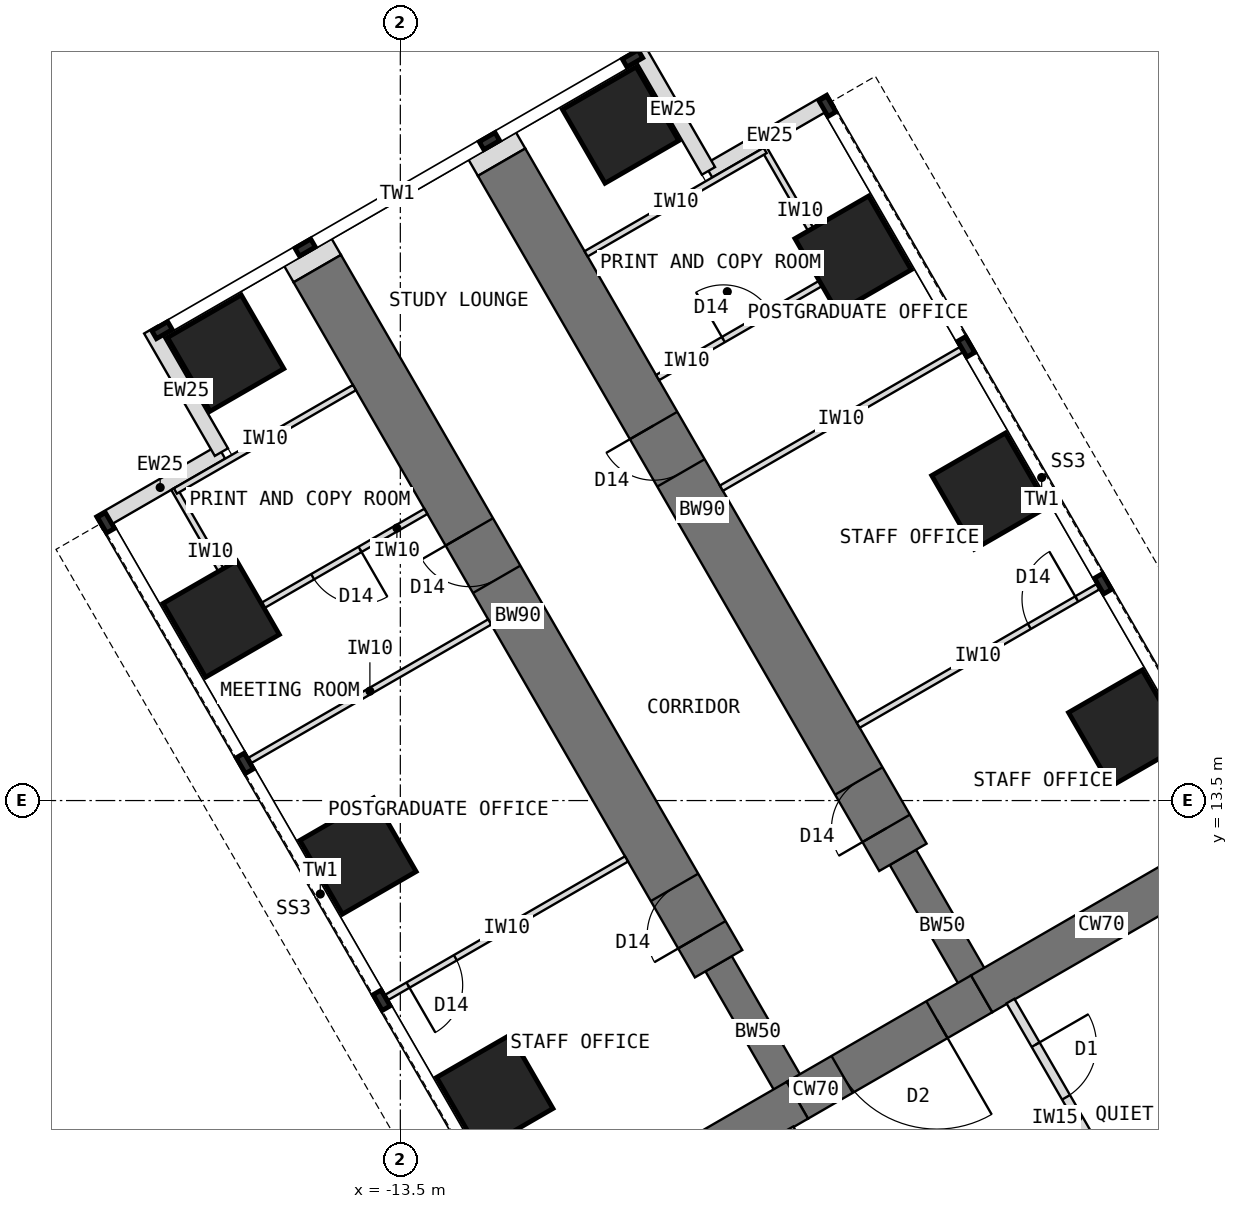
"""IFC4 building model, lengths in metres.
Left out: names, types, materials, properties, quantities, classifications, styles, units other than length and angle.
Written with IfcOpenShell. Run it as: python <this file> out.ifc"""

import sys

from ifc_helpers import new_model, si_unit, direction, frame, frame_2d, origin, origin_2d, place, context, subcontext, project, spatial, rectangle, extrude, element, fill, save


model = new_model("IFC4")
c1 = context("Model", 3, precision=1e-05, world=origin(), true_north=direction((0.0, 1.0)))
c2 = subcontext(c1, "Body", "Model", "MODEL_VIEW")
j1 = project(units=[si_unit("LENGTHUNIT", "METRE"), si_unit("PLANEANGLEUNIT", "RADIAN")], contexts=[c1])
p1 = place(None, origin())
s1 = spatial("IfcSite", under=j1, at=p1, CompositionType="ELEMENT")
p2 = place(p1, origin())
s2 = spatial("IfcBuilding", under=s1, at=p2, CompositionType="ELEMENT")
p3 = place(p2, frame((0.0, 0.0, 84.5)))
s3 = spatial("IfcBuildingStorey", under=s2, at=p3, CompositionType="ELEMENT", Elevation=84.5)
p4 = place(p3, frame((0.0, 12.596, 0.0), z_axis=(0.0, 0.0, 1.0), x_axis=(-0.866011268655, -0.500024481964, 0.0)))
e1 = element("IfcWall", 1, at=p4, inside=s3, PredefinedType="SHEAR", context=c2, shape_type="SweptSolid", body=[
    extrude(rectangle(XDim=4.548, YDim=0.7, at=frame_2d((2.274, 0.0))), origin(), (0.0, 0.0, 1.0), 4.0),
])
p5 = place(p3, frame((-3.939, 10.322, 0.0), z_axis=(0.0, 0.0, 1.0), x_axis=(-0.866019471182, -0.500010275428, 0.0)))
e2 = element("IfcWall", 2, at=p5, inside=s3, PredefinedType="SHEAR", context=c2, shape_type="SweptSolid", body=[
    extrude(rectangle(XDim=3.5, YDim=0.7, at=frame_2d((1.75, 0.0))), origin(), (0.0, 0.0, 1.0), 4.0),
])
p6 = place(p5, frame((0.85, 0.0, 0.0)))
e3 = element("IfcOpeningElement", 3, at=p6, cuts=e2, PredefinedType="OPENING", context=c2, shape_type="SweptSolid", body=[
    extrude(rectangle(XDim=1.8, YDim=2.1, at=frame_2d((0.9, 1.05))), frame((0.0, 0.36, 0.0), z_axis=(0.0, -1.0, 0.0), x_axis=(1.0, 0.0, 0.0)), (0.0, 0.0, 1.0), 0.72),
])
p7 = place(p3, frame((-6.97, 8.572, 0.0), z_axis=(0.0, 0.0, 1.0), x_axis=(-0.866034513004, -0.499984222037, 0.0)))
e4 = element("IfcWall", 4, at=p7, inside=s3, PredefinedType="SHEAR", context=c2, shape_type="SweptSolid", body=[
    extrude(rectangle(XDim=4.548, YDim=0.7, at=frame_2d((2.274, 0.0))), origin(), (0.0, 0.0, 1.0), 4.0),
])
p8 = place(p3, frame((-6.97, 8.572, 0.0), z_axis=(0.0, 0.0, 1.0), x_axis=(-0.499988811324, 0.866031863473, 0.0)))
e5 = element("IfcWall", 5, at=p8, inside=s3, PredefinedType="SHEAR", context=c2, shape_type="SweptSolid", body=[
    extrude(rectangle(XDim=2.592, YDim=0.5, at=frame_2d((1.296, 0.0))), origin(), (0.0, 0.0, 1.0), 4.0),
])
p9 = place(p3, frame((-8.266, 10.816, 0.0), z_axis=(0.0, 0.0, 1.0), x_axis=(-0.499996231654, 0.866027579429, 0.0)))
e6 = element("IfcWall", 6, at=p9, inside=s3, PredefinedType="SHEAR", context=c2, shape_type="SweptSolid", body=[
    extrude(rectangle(XDim=13.2, YDim=0.9, at=frame_2d((6.6, 0.0))), origin(), (0.0, 0.0, 1.0), 4.0),
])
p10 = place(p9, frame((0.55, 0.0, 0.0)))
e7 = element("IfcOpeningElement", 7, at=p10, cuts=e6, PredefinedType="OPENING", context=c2, shape_type="SweptSolid", body=[
    extrude(rectangle(XDim=0.9, YDim=2.1, at=frame_2d((0.45, 1.05))), frame((0.0, 0.46, 0.0), z_axis=(0.0, -1.0, 0.0), x_axis=(1.0, 0.0, 0.0)), (0.0, 0.0, 1.0), 0.92),
])
p11 = place(p9, frame((7.3, 0.0, 0.0)))
e8 = element("IfcOpeningElement", 8, at=p11, cuts=e6, PredefinedType="OPENING", context=c2, shape_type="SweptSolid", body=[
    extrude(rectangle(XDim=0.9, YDim=2.1, at=frame_2d((0.45, 1.05))), frame((0.0, 0.46, 0.0), z_axis=(0.0, -1.0, 0.0), x_axis=(1.0, 0.0, 0.0)), (0.0, 0.0, 1.0), 0.92),
])
p12 = place(p3, frame((-3.939, 10.322, 0.0), z_axis=(0.0, 0.0, 1.0), x_axis=(-0.499918158782, 0.866072649678, 0.0)))
e9 = element("IfcWall", 9, at=p12, inside=s3, PredefinedType="SHEAR", context=c2, shape_type="SweptSolid", body=[
    extrude(rectangle(XDim=2.592, YDim=0.5, at=frame_2d((1.296, 0.0))), origin(), (0.0, 0.0, 1.0), 4.0),
])
p13 = place(p3, frame((-5.234, 12.566, 0.0), z_axis=(0.0, 0.0, 1.0), x_axis=(-0.500010103361, 0.866019570528, 0.0)))
e10 = element("IfcWall", 10, at=p13, inside=s3, PredefinedType="SHEAR", context=c2, shape_type="SweptSolid", body=[
    extrude(rectangle(XDim=13.2, YDim=0.9, at=frame_2d((6.6, 0.0))), origin(), (0.0, 0.0, 1.0), 4.0),
])
p14 = place(p13, frame((0.55, 0.0, 0.0)))
e11 = element("IfcOpeningElement", 11, at=p14, cuts=e10, PredefinedType="OPENING", context=c2, shape_type="SweptSolid", body=[
    extrude(rectangle(XDim=0.9, YDim=2.1, at=frame_2d((0.45, 1.05))), frame((0.0, 0.46, 0.0), z_axis=(0.0, -1.0, 0.0), x_axis=(1.0, 0.0, 0.0)), (0.0, 0.0, 1.0), 0.92),
])
p15 = place(p13, frame((7.3, 0.0, 0.0)))
e12 = element("IfcOpeningElement", 12, at=p15, cuts=e10, PredefinedType="OPENING", context=c2, shape_type="SweptSolid", body=[
    extrude(rectangle(XDim=0.9, YDim=2.1, at=frame_2d((0.45, 1.05))), frame((0.0, 0.46, 0.0), z_axis=(0.0, -1.0, 0.0), x_axis=(1.0, 0.0, 0.0)), (0.0, 0.0, 1.0), 0.92),
])
for number, where, z_axis, x_axis in (
    (13, (-11.946, 8.691, 0.0), (0.0, 0.0, 1.0), (0.866, 0.5, 0.0)),
    (14, (-1.554, 14.691, 0.0), (0.0, 0.0, 1.0), (0.866, 0.5, 0.0)),
    (15, (-14.196, 12.588, 0.0), (0.0, 0.0, 1.0), (0.866, 0.5, 0.0)),
    (16, (-3.804, 18.588, 0.0), (0.0, 0.0, 1.0), (0.866, 0.5, 0.0)),
    (17, (-16.446, 16.486, 0.0), (0.0, 0.0, 1.0), (0.866, 0.5, 0.0)),
    (18, (-6.054, 22.486, 0.0), (0.0, 0.0, 1.0), (0.866, 0.5, 0.0)),
    (19, (-16.373, 20.858, 0.0), (0.0, 0.0, 1.0), (0.866, 0.5, 0.0)),
    (20, (-9.877, 24.608, 0.0), (0.0, 0.0, 1.0), (0.866, 0.5, 0.0)),
):
    element("IfcColumn", number, at=place(p3, frame(where, z_axis=z_axis, x_axis=x_axis)), inside=s3, PredefinedType="COLUMN", context=c2, shape_type="SweptSolid", body=[
        extrude(rectangle(XDim=1.4, YDim=1.4, at=origin_2d()), origin(), (0.0, 0.0, 1.0), 4.0),
    ])
for number, where, z_axis, x_axis in (
    (21, (-18.456, 18.067, 0.0), (0.0, 0.0, 1.0), (0.866, 0.5, 0.0)),
    (22, (-16.443, 19.23, 0.0), (0.0, 0.0, 1.0), (-0.5, 0.866, 0.0)),
    (23, (-6.419, 25.017, 0.0), (0.0, 0.0, 1.0), (-0.866, -0.5, 0.0)),
    (24, (-8.432, 23.855, 0.0), (0.0, 0.0, 1.0), (-0.5, 0.866, 0.0)),
):
    element("IfcWall", number, at=place(p3, frame(where, z_axis=z_axis, x_axis=x_axis)), inside=s3, PredefinedType="STANDARD", context=c2, shape_type="SweptSolid", body=[
        extrude(rectangle(XDim=2.325, YDim=0.25, at=frame_2d((1.163, 0.0))), origin(), (0.0, 0.0, 1.0), 3.8),
    ])
for number, where, z_axis, x_axis in (
    (25, (-14.865, 22.248, 0.0), (0.0, 0.0, 1.0), (-0.5, 0.866, 0.0)),
    (26, (-11.834, 23.998, 0.0), (0.0, 0.0, 1.0), (-0.5, 0.866, 0.0)),
):
    element("IfcWall", number, at=place(p3, frame(where, z_axis=z_axis, x_axis=x_axis)), inside=s3, PredefinedType="PARTITIONING", context=c2, shape_type="SweptSolid", body=[
        extrude(rectangle(XDim=0.31, YDim=0.9, at=frame_2d((0.155, 0.0))), origin(), (0.0, 0.0, 1.0), 3.8),
    ])
p16 = place(p3, frame((-1.201, 6.12, 0.0), z_axis=(0.0, 0.0, 1.0), x_axis=(0.500002627198, 0.866023886965, 0.0)))
e27 = element("IfcWall", 27, at=p16, inside=s3, PredefinedType="SHEAR", context=c2, shape_type="SweptSolid", body=[
    extrude(rectangle(XDim=5.858, YDim=0.4, at=frame_2d((2.929, 0.0))), origin(), (0.0, 0.0, 1.0), 4.0),
])
p17 = place(p3, frame((-9.78, 12.54, 0.0), z_axis=(0.0, 0.0, 1.0), x_axis=(-0.866035472144, -0.499982560684, 0.0)))
e28 = element("IfcWall", 28, at=p17, inside=s3, PredefinedType="PARTITIONING", context=c2, shape_type="SweptSolid", body=[
    extrude(rectangle(XDim=4.55, YDim=0.1, at=frame_2d((2.275, 0.0))), origin(), (0.0, 0.0, 1.0), 3.8),
])
p18 = place(p17, frame((3.25, 0.0, 0.0)))
e29 = element("IfcOpeningElement", 29, at=p18, cuts=e28, PredefinedType="OPENING", context=c2, shape_type="SweptSolid", body=[
    extrude(rectangle(XDim=0.9, YDim=2.1, at=frame_2d((0.45, 1.05))), frame((0.0, 0.06, 0.0), z_axis=(0.0, -1.0, 0.0), x_axis=(1.0, 0.0, 0.0)), (0.0, 0.0, 1.0), 0.12),
])
p19 = place(p3, frame((-12.03, 16.437, 0.0), z_axis=(0.0, 0.0, 1.0), x_axis=(-0.866035472144, -0.499982560684, 0.0)))
e30 = element("IfcWall", 30, at=p19, inside=s3, PredefinedType="PARTITIONING", context=c2, shape_type="SweptSolid", body=[
    extrude(rectangle(XDim=4.55, YDim=0.1, at=frame_2d((2.275, 0.0))), origin(), (0.0, 0.0, 1.0), 3.8),
])
p20 = place(p3, frame((-16.025, 16.556, 0.0), z_axis=(0.0, 0.0, 1.0), x_axis=(-0.500077600433, 0.865980596518, 0.0)))
e31 = element("IfcWall", 31, at=p20, inside=s3, PredefinedType="PARTITIONING", context=c2, shape_type="SweptSolid", body=[
    extrude(rectangle(XDim=2.4, YDim=0.1, at=frame_2d((1.2, 0.0))), origin(), (0.0, 0.0, 1.0), 3.8),
])
p21 = place(p3, frame((-13.08, 18.256, 0.0), z_axis=(0.0, 0.0, 1.0), x_axis=(-0.866020560687, -0.500008388397, 0.0)))
e32 = element("IfcWall", 32, at=p21, inside=s3, PredefinedType="PARTITIONING", context=c2, shape_type="SweptSolid", body=[
    extrude(rectangle(XDim=3.4, YDim=0.1, at=frame_2d((1.7, 0.0))), origin(), (0.0, 0.0, 1.0), 3.8),
])
p22 = place(p21, frame((1.25, 0.0, 0.0)))
e33 = element("IfcOpeningElement", 33, at=p22, cuts=e32, PredefinedType="OPENING", context=c2, shape_type="SweptSolid", body=[
    extrude(rectangle(XDim=0.9, YDim=2.1, at=frame_2d((0.45, 1.05))), frame((0.0, 0.06, 0.0), z_axis=(0.0, -1.0, 0.0), x_axis=(1.0, 0.0, 0.0)), (0.0, 0.0, 1.0), 0.12),
])
p23 = place(p3, frame((-14.255, 20.291, 0.0), z_axis=(0.0, 0.0, 1.0), x_axis=(-0.866020560687, -0.500008388397, 0.0)))
e34 = element("IfcWall", 34, at=p23, inside=s3, PredefinedType="PARTITIONING", context=c2, shape_type="SweptSolid", body=[
    extrude(rectangle(XDim=3.4, YDim=0.1, at=frame_2d((1.7, 0.0))), origin(), (0.0, 0.0, 1.0), 3.8),
])
p24 = place(p3, frame((-5.97, 14.74, 0.0), z_axis=(0.0, 0.0, 1.0), x_axis=(0.866035472144, 0.499982560684, 0.0)))
e35 = element("IfcWall", 35, at=p24, inside=s3, PredefinedType="PARTITIONING", context=c2, shape_type="SweptSolid", body=[
    extrude(rectangle(XDim=4.55, YDim=0.1, at=frame_2d((2.275, 0.0))), origin(), (0.0, 0.0, 1.0), 3.8),
])
p25 = place(p24, frame((3.25, 0.0, 0.0)))
e36 = element("IfcOpeningElement", 36, at=p25, cuts=e35, PredefinedType="OPENING", context=c2, shape_type="SweptSolid", body=[
    extrude(rectangle(XDim=0.9, YDim=2.1, at=frame_2d((0.45, 1.05))), frame((0.0, 0.06, 0.0), z_axis=(0.0, -1.0, 0.0), x_axis=(1.0, 0.0, 0.0)), (0.0, 0.0, 1.0), 0.12),
])
p26 = place(p3, frame((-8.22, 18.637, 0.0), z_axis=(0.0, 0.0, 1.0), x_axis=(0.866012237902, 0.500022803284, 0.0)))
e37 = element("IfcWall", 37, at=p26, inside=s3, PredefinedType="PARTITIONING", context=c2, shape_type="SweptSolid", body=[
    extrude(rectangle(XDim=4.55, YDim=0.1, at=frame_2d((2.275, 0.0))), origin(), (0.0, 0.0, 1.0), 3.8),
])
p27 = place(p3, frame((-6.325, 22.156, 0.0), z_axis=(0.0, 0.0, 1.0), x_axis=(-0.500001309137, 0.866024647952, 0.0)))
e38 = element("IfcWall", 38, at=p27, inside=s3, PredefinedType="PARTITIONING", context=c2, shape_type="SweptSolid", body=[
    extrude(rectangle(XDim=2.4, YDim=0.1, at=frame_2d((1.2, 0.0))), origin(), (0.0, 0.0, 1.0), 3.8),
])
p28 = place(p3, frame((-9.27, 20.456, 0.0), z_axis=(0.0, 0.0, 1.0), x_axis=(0.866007419912, 0.500031147688, 0.0)))
e39 = element("IfcWall", 39, at=p28, inside=s3, PredefinedType="PARTITIONING", context=c2, shape_type="SweptSolid", body=[
    extrude(rectangle(XDim=3.4, YDim=0.1, at=frame_2d((1.7, 0.0))), origin(), (0.0, 0.0, 1.0), 3.8),
])
p29 = place(p28, frame((1.25, 0.0, 0.0)))
e40 = element("IfcOpeningElement", 40, at=p29, cuts=e39, PredefinedType="OPENING", context=c2, shape_type="SweptSolid", body=[
    extrude(rectangle(XDim=0.9, YDim=2.1, at=frame_2d((0.45, 1.05))), frame((0.0, 0.06, 0.0), z_axis=(0.0, -1.0, 0.0), x_axis=(1.0, 0.0, 0.0)), (0.0, 0.0, 1.0), 0.12),
])
p30 = place(p3, frame((-10.445, 22.491, 0.0), z_axis=(0.0, 0.0, 1.0), x_axis=(0.866007419912, 0.500031147688, 0.0)))
e41 = element("IfcWall", 41, at=p30, inside=s3, PredefinedType="PARTITIONING", context=c2, shape_type="SweptSolid", body=[
    extrude(rectangle(XDim=3.4, YDim=0.1, at=frame_2d((1.7, 0.0))), origin(), (0.0, 0.0, 1.0), 3.8),
])
p31 = place(p3, frame((-4.89, 4.27, 0.0), z_axis=(0.0, 0.0, 1.0), x_axis=(-0.500007369519, 0.866021148949, 0.0)))
e42 = element("IfcWall", 42, at=p31, inside=s3, PredefinedType="PARTITIONING", context=c2, shape_type="SweptSolid", body=[
    extrude(rectangle(XDim=4.426, YDim=0.15, at=frame_2d((2.213, 0.0))), origin(), (0.0, 0.0, 1.0), 3.8),
])
p32 = place(p31, frame((0.828, 0.0, 0.0)))
e43 = element("IfcOpeningElement", 43, at=p32, cuts=e42, PredefinedType="OPENING", context=c2, shape_type="SweptSolid", body=[
    extrude(rectangle(XDim=1.0, YDim=2.1, at=frame_2d((0.5, 1.05))), frame((0.0, 0.085, 0.0), z_axis=(0.0, -1.0, 0.0), x_axis=(1.0, 0.0, 0.0)), (0.0, 0.0, 1.0), 0.17),
])
p33 = place(p3, frame((-3.466, 10.202, 0.0), z_axis=(0.0, 0.0, 1.0), x_axis=(0.500007369519, -0.866021148949, 0.0)))
e44 = element("IfcWall", 44, at=p33, inside=s3, PredefinedType="PARTITIONING", context=c2, shape_type="SweptSolid", body=[
    extrude(rectangle(XDim=4.426, YDim=0.15, at=frame_2d((2.213, 0.0))), origin(), (0.0, 0.0, 1.0), 3.8),
])
p34 = place(p33, frame((0.828, 0.0, 0.0)))
e45 = element("IfcOpeningElement", 45, at=p34, cuts=e44, PredefinedType="OPENING", context=c2, shape_type="SweptSolid", body=[
    extrude(rectangle(XDim=1.0, YDim=2.1, at=frame_2d((0.5, 1.05))), frame((0.0, 0.085, 0.0), z_axis=(0.0, -1.0, 0.0), x_axis=(1.0, 0.0, 0.0)), (0.0, 0.0, 1.0), 0.17),
])
p35 = place(p6, origin())
e46 = element("IfcDoor", 46, at=p35, inside=s3, OperationType="DOUBLE_DOOR_DOUBLE_SWING", PredefinedType="DOOR", context=c2, shape_type="SweptSolid", body=[
    extrude(rectangle(XDim=1.72, YDim=2.06, at=frame_2d((0.9, 1.03))), frame((0.0, 0.025, 0.0), z_axis=(0.0, -1.0, 0.0), x_axis=(1.0, 0.0, 0.0)), (0.0, 0.0, 1.0), 0.05),
    extrude(rectangle(XDim=0.04, YDim=2.1, at=frame_2d((0.02, 1.05))), frame((0.0, 0.35, 0.0), z_axis=(0.0, -1.0, 0.0), x_axis=(1.0, 0.0, 0.0)), (0.0, 0.0, 1.0), 0.699),
    extrude(rectangle(XDim=0.04, YDim=2.1, at=frame_2d((1.78, 1.05))), frame((0.0, 0.35, 0.0), z_axis=(0.0, -1.0, 0.0), x_axis=(1.0, 0.0, 0.0)), (0.0, 0.0, 1.0), 0.699),
    extrude(rectangle(XDim=1.72, YDim=0.04, at=frame_2d((0.9, 2.08))), frame((0.0, 0.35, 0.0), z_axis=(0.0, -1.0, 0.0), x_axis=(1.0, 0.0, 0.0)), (0.0, 0.0, 1.0), 0.699),
])
fill(e3, e46)
p36 = place(p18, origin())
e47 = element("IfcDoor", 47, at=p36, inside=s3, OperationType="SINGLE_SWING_RIGHT", PredefinedType="DOOR", context=c2, shape_type="SweptSolid", body=[
    extrude(rectangle(XDim=0.9, YDim=2.1, at=frame_2d((0.45, 1.05))), frame((0.0, 0.025, 0.0), z_axis=(0.0, -1.0, 0.0), x_axis=(1.0, 0.0, 0.0)), (0.0, 0.0, 1.0), 0.05),
])
fill(e29, e47)
p37 = place(p22, origin())
e48 = element("IfcDoor", 48, at=p37, inside=s3, OperationType="SINGLE_SWING_LEFT", PredefinedType="DOOR", context=c2, shape_type="SweptSolid", body=[
    extrude(rectangle(XDim=0.9, YDim=2.1, at=frame_2d((0.45, 1.05))), frame((0.0, 0.025, 0.0), z_axis=(0.0, -1.0, 0.0), x_axis=(1.0, 0.0, 0.0)), (0.0, 0.0, 1.0), 0.05),
])
fill(e33, e48)
p38 = place(p25, origin())
e49 = element("IfcDoor", 49, at=p38, inside=s3, OperationType="SINGLE_SWING_RIGHT", PredefinedType="DOOR", context=c2, shape_type="SweptSolid", body=[
    extrude(rectangle(XDim=0.9, YDim=2.1, at=frame_2d((0.45, 1.05))), frame((0.0, 0.025, 0.0), z_axis=(0.0, -1.0, 0.0), x_axis=(1.0, 0.0, 0.0)), (0.0, 0.0, 1.0), 0.05),
])
fill(e36, e49)
p39 = place(p29, origin())
e50 = element("IfcDoor", 50, at=p39, inside=s3, OperationType="SINGLE_SWING_LEFT", PredefinedType="DOOR", context=c2, shape_type="SweptSolid", body=[
    extrude(rectangle(XDim=0.9, YDim=2.1, at=frame_2d((0.45, 1.05))), frame((0.0, 0.025, 0.0), z_axis=(0.0, -1.0, 0.0), x_axis=(1.0, 0.0, 0.0)), (0.0, 0.0, 1.0), 0.05),
])
fill(e40, e50)
p40 = place(p34, origin())
e51 = element("IfcDoor", 51, at=p40, inside=s3, OperationType="SINGLE_SWING_LEFT", PredefinedType="DOOR", context=c2, shape_type="SweptSolid", body=[
    extrude(rectangle(XDim=1.0, YDim=2.1, at=frame_2d((0.5, 1.05))), frame((0.0, 0.025, 0.0), z_axis=(0.0, -1.0, 0.0), x_axis=(1.0, 0.0, 0.0)), (0.0, 0.0, 1.0), 0.05),
])
fill(e45, e51)
p41 = place(p10, origin())
e52 = element("IfcDoor", 52, at=p41, inside=s3, OperationType="SINGLE_SWING_LEFT", PredefinedType="DOOR", context=c2, shape_type="SweptSolid", body=[
    extrude(rectangle(XDim=0.82, YDim=2.06, at=frame_2d((0.45, 1.03))), frame((0.0, 0.025, 0.0), z_axis=(0.0, -1.0, 0.0), x_axis=(1.0, 0.0, 0.0)), (0.0, 0.0, 1.0), 0.05),
    extrude(rectangle(XDim=0.04, YDim=2.1, at=frame_2d((0.02, 1.05))), frame((0.0, 0.45, 0.0), z_axis=(0.0, -1.0, 0.0), x_axis=(1.0, 0.0, 0.0)), (0.0, 0.0, 1.0), 0.899),
    extrude(rectangle(XDim=0.04, YDim=2.1, at=frame_2d((0.88, 1.05))), frame((0.0, 0.45, 0.0), z_axis=(0.0, -1.0, 0.0), x_axis=(1.0, 0.0, 0.0)), (0.0, 0.0, 1.0), 0.899),
    extrude(rectangle(XDim=0.82, YDim=0.04, at=frame_2d((0.45, 2.08))), frame((0.0, 0.45, 0.0), z_axis=(0.0, -1.0, 0.0), x_axis=(1.0, 0.0, 0.0)), (0.0, 0.0, 1.0), 0.899),
])
fill(e7, e52)
p42 = place(p11, origin())
e53 = element("IfcDoor", 53, at=p42, inside=s3, OperationType="SINGLE_SWING_RIGHT", PredefinedType="DOOR", context=c2, shape_type="SweptSolid", body=[
    extrude(rectangle(XDim=0.82, YDim=2.06, at=frame_2d((0.45, 1.03))), frame((0.0, 0.025, 0.0), z_axis=(0.0, -1.0, 0.0), x_axis=(1.0, 0.0, 0.0)), (0.0, 0.0, 1.0), 0.05),
    extrude(rectangle(XDim=0.04, YDim=2.1, at=frame_2d((0.02, 1.05))), frame((0.0, 0.45, 0.0), z_axis=(0.0, -1.0, 0.0), x_axis=(1.0, 0.0, 0.0)), (0.0, 0.0, 1.0), 0.899),
    extrude(rectangle(XDim=0.04, YDim=2.1, at=frame_2d((0.88, 1.05))), frame((0.0, 0.45, 0.0), z_axis=(0.0, -1.0, 0.0), x_axis=(1.0, 0.0, 0.0)), (0.0, 0.0, 1.0), 0.899),
    extrude(rectangle(XDim=0.82, YDim=0.04, at=frame_2d((0.45, 2.08))), frame((0.0, 0.45, 0.0), z_axis=(0.0, -1.0, 0.0), x_axis=(1.0, 0.0, 0.0)), (0.0, 0.0, 1.0), 0.899),
])
fill(e8, e53)
p43 = place(p14, origin())
e54 = element("IfcDoor", 54, at=p43, inside=s3, OperationType="SINGLE_SWING_LEFT", PredefinedType="DOOR", context=c2, shape_type="SweptSolid", body=[
    extrude(rectangle(XDim=0.82, YDim=2.06, at=frame_2d((0.45, 1.03))), frame((0.0, 0.025, 0.0), z_axis=(0.0, -1.0, 0.0), x_axis=(1.0, 0.0, 0.0)), (0.0, 0.0, 1.0), 0.05),
    extrude(rectangle(XDim=0.04, YDim=2.1, at=frame_2d((0.02, 1.05))), frame((0.0, 0.45, 0.0), z_axis=(0.0, -1.0, 0.0), x_axis=(1.0, 0.0, 0.0)), (0.0, 0.0, 1.0), 0.899),
    extrude(rectangle(XDim=0.04, YDim=2.1, at=frame_2d((0.88, 1.05))), frame((0.0, 0.45, 0.0), z_axis=(0.0, -1.0, 0.0), x_axis=(1.0, 0.0, 0.0)), (0.0, 0.0, 1.0), 0.899),
    extrude(rectangle(XDim=0.82, YDim=0.04, at=frame_2d((0.45, 2.08))), frame((0.0, 0.45, 0.0), z_axis=(0.0, -1.0, 0.0), x_axis=(1.0, 0.0, 0.0)), (0.0, 0.0, 1.0), 0.899),
])
fill(e11, e54)
p44 = place(p15, origin())
e55 = element("IfcDoor", 55, at=p44, inside=s3, OperationType="SINGLE_SWING_RIGHT", PredefinedType="DOOR", context=c2, shape_type="SweptSolid", body=[
    extrude(rectangle(XDim=0.82, YDim=2.06, at=frame_2d((0.45, 1.03))), frame((0.0, 0.025, 0.0), z_axis=(0.0, -1.0, 0.0), x_axis=(1.0, 0.0, 0.0)), (0.0, 0.0, 1.0), 0.05),
    extrude(rectangle(XDim=0.04, YDim=2.1, at=frame_2d((0.02, 1.05))), frame((0.0, 0.45, 0.0), z_axis=(0.0, -1.0, 0.0), x_axis=(1.0, 0.0, 0.0)), (0.0, 0.0, 1.0), 0.899),
    extrude(rectangle(XDim=0.04, YDim=2.1, at=frame_2d((0.88, 1.05))), frame((0.0, 0.45, 0.0), z_axis=(0.0, -1.0, 0.0), x_axis=(1.0, 0.0, 0.0)), (0.0, 0.0, 1.0), 0.899),
    extrude(rectangle(XDim=0.82, YDim=0.04, at=frame_2d((0.45, 2.08))), frame((0.0, 0.45, 0.0), z_axis=(0.0, -1.0, 0.0), x_axis=(1.0, 0.0, 0.0)), (0.0, 0.0, 1.0), 0.899),
])
fill(e12, e55)
save(model, sys.argv[1])
